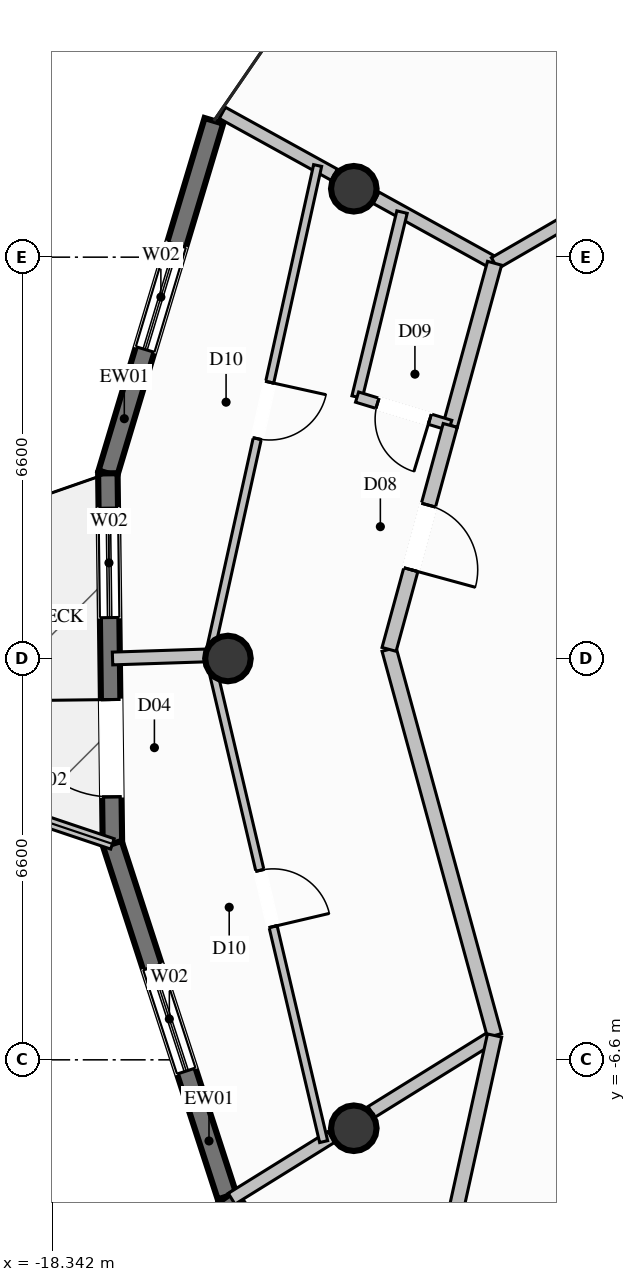
"""IFC4 building model, lengths in metres.
Left out: names, types, materials, properties, quantities, classifications, styles, units other than length and angle.
Written with IfcOpenShell. Run it as: python <this file> out.ifc"""

import sys

from ifc_helpers import new_model, si_unit, direction, frame, frame_2d, origin, origin_2d, place, context, subcontext, project, spatial, rectangle, circle, extrude, element, fill, save


model = new_model("IFC4")
c1 = context("Model", 3, precision=1e-05, world=origin(), true_north=direction((0.0, 1.0)))
c2 = subcontext(c1, "Body", "Model", "MODEL_VIEW")
j1 = project(units=[si_unit("LENGTHUNIT", "METRE"), si_unit("PLANEANGLEUNIT", "RADIAN")], contexts=[c1])
p1 = place(None, origin())
s1 = spatial("IfcSite", under=j1, at=p1, CompositionType="ELEMENT")
p2 = place(p1, origin())
s2 = spatial("IfcBuilding", under=s1, at=p2, CompositionType="ELEMENT")
p3 = place(p2, frame((0.0, 0.0, 250.6)))
s3 = spatial("IfcBuildingStorey", under=s2, at=p3, CompositionType="ELEMENT", Elevation=250.6)
for number, where, z_axis, x_axis in (
    (1, (-13.38, 7.725, 0.0), (0.0, 0.0, 1.0), (1.0, 0.0, 0.0)),
    (2, (-15.45, 0.0, 0.0), (0.0, 0.0, 1.0), (1.0, 0.0, 0.0)),
    (3, (-13.38, -7.725, 0.0), (0.0, 0.0, 1.0), (1.0, 0.0, 0.0)),
):
    element("IfcColumn", number, at=place(p3, frame(where, z_axis=z_axis, x_axis=x_axis)), inside=s3, PredefinedType="COLUMN", context=c2, shape_type="SweptSolid", body=[
        extrude(circle(Radius=0.375, at=origin_2d()), origin(), (0.0, 0.0, 1.0), 3.8),
    ])
p4 = place(p3, frame((-17.425, 3.045, 0.0), z_axis=(0.0, 0.0, 1.0), x_axis=(0.288106265848, 0.957598443806, 0.0)))
e4 = element("IfcWall", 4, at=p4, inside=s3, PredefinedType="SOLIDWALL", context=c2, shape_type="SweptSolid", body=[
    extrude(rectangle(XDim=6.054, YDim=0.32, at=frame_2d((3.027, 0.0))), origin(), (0.0, 0.0, 1.0), 3.57),
])
p5 = place(p4, frame((2.127, 0.0, 0.35)))
e5 = element("IfcOpeningElement", 5, at=p5, cuts=e4, PredefinedType="OPENING", context=c2, shape_type="SweptSolid", body=[
    extrude(rectangle(XDim=1.8, YDim=2.6, at=frame_2d((0.9, 1.3))), frame((0.0, 0.17, 0.0), z_axis=(0.0, -1.0, 0.0), x_axis=(1.0, 0.0, 0.0)), (0.0, 0.0, 1.0), 0.34),
])
p6 = place(p3, frame((-17.35, -3.049, 0.0), z_axis=(0.0, 0.0, 1.0), x_axis=(-0.012298256588, 0.999924373583, 0.0)))
e6 = element("IfcWall", 6, at=p6, inside=s3, PredefinedType="SOLIDWALL", context=c2, shape_type="SweptSolid", body=[
    extrude(rectangle(XDim=6.094, YDim=0.32, at=frame_2d((3.047, 0.0))), origin(), (0.0, 0.0, 1.0), 3.57),
])
p7 = place(p6, frame((3.722, 0.0, 0.35)))
e7 = element("IfcOpeningElement", 7, at=p7, cuts=e6, PredefinedType="OPENING", context=c2, shape_type="SweptSolid", body=[
    extrude(rectangle(XDim=1.8, YDim=2.6, at=frame_2d((0.9, 1.3))), frame((0.0, 0.17, 0.0), z_axis=(0.0, -1.0, 0.0), x_axis=(1.0, 0.0, 0.0)), (0.0, 0.0, 1.0), 0.34),
])
p8 = place(p6, frame((0.774, 0.0, 0.0)))
e8 = element("IfcOpeningElement", 8, at=p8, cuts=e6, PredefinedType="OPENING", context=c2, shape_type="SweptSolid", body=[
    extrude(rectangle(XDim=1.6, YDim=2.3, at=frame_2d((0.8, 1.15))), frame((0.0, 0.17, 0.0), z_axis=(0.0, -1.0, 0.0), x_axis=(1.0, 0.0, 0.0)), (0.0, 0.0, 1.0), 0.34),
])
p9 = place(p3, frame((-15.465, -8.846, 0.0), z_axis=(0.0, 0.0, 1.0), x_axis=(-0.309238214559, 0.950984609053, 0.0)))
e9 = element("IfcWall", 9, at=p9, inside=s3, PredefinedType="SOLIDWALL", context=c2, shape_type="SweptSolid", body=[
    extrude(rectangle(XDim=6.096, YDim=0.32, at=frame_2d((3.048, 0.0))), origin(), (0.0, 0.0, 1.0), 3.57),
])
p10 = place(p9, frame((2.168, 0.0, 0.35)))
e10 = element("IfcOpeningElement", 10, at=p10, cuts=e9, PredefinedType="OPENING", context=c2, shape_type="SweptSolid", body=[
    extrude(rectangle(XDim=1.8, YDim=2.6, at=frame_2d((0.9, 1.3))), frame((0.0, 0.17, 0.0), z_axis=(0.0, -1.0, 0.0), x_axis=(1.0, 0.0, 0.0)), (0.0, 0.0, 1.0), 0.34),
])
p11 = place(p3, frame((-11.953, -13.776, 0.0), z_axis=(0.0, 0.0, 1.0), x_axis=(-0.580234325627, 0.814449585526, 0.0)))
e11 = element("IfcWall", 11, at=p11, inside=s3, PredefinedType="SOLIDWALL", context=c2, shape_type="SweptSolid", body=[
    extrude(rectangle(XDim=6.053, YDim=0.32, at=frame_2d((3.026, 0.0))), origin(), (0.0, 0.0, 1.0), 3.57),
])
p12 = place(p11, frame((2.994, 0.0, 0.35)))
e12 = element("IfcOpeningElement", 12, at=p12, cuts=e11, PredefinedType="OPENING", context=c2, shape_type="SweptSolid", body=[
    extrude(rectangle(XDim=1.8, YDim=2.6, at=frame_2d((0.9, 1.3))), frame((0.0, 0.17, 0.0), z_axis=(0.0, -1.0, 0.0), x_axis=(1.0, 0.0, 0.0)), (0.0, 0.0, 1.0), 0.34),
])
p13 = place(p3, frame((-19.525, -2.318, 0.0), z_axis=(0.0, 0.0, 1.0), x_axis=(0.947892929032, -0.318589069322, 0.0)))
e13 = element("IfcWall", 13, at=p13, inside=s3, PredefinedType="PARAPET", context=c2, shape_type="SweptSolid", body=[
    extrude(rectangle(XDim=2.294, YDim=0.18, at=frame_2d((1.147, 0.0))), origin(), (0.0, 0.0, 1.0), 1.12),
])
p14 = place(p3, frame((-11.065, 6.5, 0.0), z_axis=(0.0, 0.0, 1.0), x_axis=(-0.875272070591, 0.483630853486, 0.0)))
e14 = element("IfcWall", 14, at=p14, inside=s3, PredefinedType="PARTITIONING", context=c2, shape_type="SweptSolid", body=[
    extrude(rectangle(XDim=2.227, YDim=0.21, at=frame_2d((1.113, 0.0))), origin(), (0.0, 0.0, 1.0), 3.086),
])
p15 = place(p3, frame((-13.701, 7.956, 0.0), z_axis=(0.0, 0.0, 1.0), x_axis=(-0.875359190626, 0.483473150637, 0.0)))
e15 = element("IfcWall", 15, at=p15, inside=s3, PredefinedType="PARTITIONING", context=c2, shape_type="SweptSolid", body=[
    extrude(rectangle(XDim=2.103, YDim=0.21, at=frame_2d((1.052, 0.0))), origin(), (0.0, 0.0, 1.0), 3.57),
])
p16 = place(p3, frame((-11.065, -6.2, 0.0), z_axis=(0.0, 0.0, 1.0), x_axis=(-0.84962275773, -0.527390907722, 0.0)))
e16 = element("IfcWall", 16, at=p16, inside=s3, PredefinedType="PARTITIONING", context=c2, shape_type="SweptSolid", body=[
    extrude(rectangle(XDim=2.384, YDim=0.21, at=frame_2d((1.192, 0.0))), origin(), (0.0, 0.0, 1.0), 3.086),
])
p17 = place(p3, frame((-13.749, -7.867, 0.0), z_axis=(0.0, 0.0, 1.0), x_axis=(-0.849593260604, -0.527438424403, 0.0)))
e17 = element("IfcWall", 17, at=p17, inside=s3, PredefinedType="PARTITIONING", context=c2, shape_type="SweptSolid", body=[
    extrude(rectangle(XDim=1.93, YDim=0.21, at=frame_2d((0.965, 0.0))), origin(), (0.0, 0.0, 1.0), 3.57),
])
p18 = place(p3, frame((-11.065, 6.5, 0.0), z_axis=(0.0, 0.0, 1.0), x_axis=(0.865506757898, 0.50089724698, 0.0)))
e18 = element("IfcWall", 18, at=p18, inside=s3, PredefinedType="PARTITIONING", context=c2, shape_type="SweptSolid", body=[
    extrude(rectangle(XDim=4.292, YDim=0.21, at=frame_2d((2.146, 0.0))), origin(), (0.0, 0.0, 1.0), 3.57),
])
p19 = place(p3, frame((-11.065, 6.5, 0.0), z_axis=(0.0, 0.0, 1.0), x_axis=(-0.263670269996, -0.964612869871, 0.0)))
e19 = element("IfcWall", 19, at=p19, inside=s3, PredefinedType="PARTITIONING", context=c2, shape_type="SweptSolid", body=[
    extrude(rectangle(XDim=2.765, YDim=0.24, at=frame_2d((1.382, 0.0))), origin(), (0.0, 0.0, 1.0), 3.57),
])
p20 = place(p3, frame((-12.587, 7.341, 0.0), z_axis=(0.0, 0.0, 1.0), x_axis=(-0.236070972306, -0.971735815968, 0.0)))
e20 = element("IfcWall", 20, at=p20, inside=s3, PredefinedType="PLUMBINGWALL", context=c2, shape_type="SweptSolid", body=[
    extrude(rectangle(XDim=3.13, YDim=0.175, at=frame_2d((1.565, 0.0))), origin(), (0.0, 0.0, 1.0), 3.57),
])
p21 = place(p3, frame((-11.794, 3.833, 0.0), z_axis=(0.0, 0.0, 1.0), x_axis=(-0.956707110137, 0.29105241008, 0.0)))
e21 = element("IfcWall", 21, at=p21, inside=s3, PredefinedType="PLUMBINGWALL", context=c2, shape_type="SweptSolid", body=[
    extrude(rectangle(XDim=1.601, YDim=0.175, at=frame_2d((0.801, 0.0))), origin(), (0.0, 0.0, 1.0), 3.57),
])
p22 = place(p21, frame((0.351, 0.0, 0.0)))
e22 = element("IfcOpeningElement", 22, at=p22, cuts=e21, PredefinedType="OPENING", context=c2, shape_type="SweptSolid", body=[
    extrude(rectangle(XDim=0.9, YDim=2.1, at=frame_2d((0.45, 1.05))), frame((0.0, 0.098, 0.0), z_axis=(0.0, -1.0, 0.0), x_axis=(1.0, 0.0, 0.0)), (0.0, 0.0, 1.0), 0.195),
])
p23 = place(p3, frame((-15.756, 0.052, 0.0), z_axis=(0.0, 0.0, 1.0), x_axis=(-0.999466804389, -0.032651292843, 0.0)))
e23 = element("IfcWall", 23, at=p23, inside=s3, PredefinedType="PARTITIONING", context=c2, shape_type="SweptSolid", body=[
    extrude(rectangle(XDim=1.593, YDim=0.21, at=frame_2d((0.796, 0.0))), origin(), (0.0, 0.0, 1.0), 3.57),
])
p24 = place(p3, frame((-12.8, 0.15, 0.0), z_axis=(0.0, 0.0, 1.0), x_axis=(0.263588113382, -0.964635323054, 0.0)))
e24 = element("IfcWall", 24, at=p24, inside=s3, PredefinedType="PARTITIONING", context=c2, shape_type="SweptSolid", body=[
    extrude(rectangle(XDim=6.583, YDim=0.24, at=frame_2d((3.292, 0.0))), origin(), (0.0, 0.0, 1.0), 3.57),
])
p25 = place(p3, frame((-11.794, 3.833, 0.0), z_axis=(0.0, 0.0, 1.0), x_axis=(-0.263512359615, -0.964656019693, 0.0)))
e25 = element("IfcWall", 25, at=p25, inside=s3, PredefinedType="PARTITIONING", context=c2, shape_type="SweptSolid", body=[
    extrude(rectangle(XDim=3.818, YDim=0.24, at=frame_2d((1.909, 0.0))), origin(), (0.0, 0.0, 1.0), 3.57),
])
p26 = place(p25, frame((1.359, 0.0, 0.0)))
e26 = element("IfcOpeningElement", 26, at=p26, cuts=e25, PredefinedType="OPENING", context=c2, shape_type="SweptSolid", body=[
    extrude(rectangle(XDim=1.1, YDim=2.3, at=frame_2d((0.55, 1.15))), frame((0.0, 0.13, 0.0), z_axis=(0.0, -1.0, 0.0), x_axis=(1.0, 0.0, 0.0)), (0.0, 0.0, 1.0), 0.26),
])
p27 = place(p3, frame((-13.975, 8.107, 0.0), z_axis=(0.0, 0.0, 1.0), x_axis=(-0.215893129174, -0.97641699943, 0.0)))
e27 = element("IfcWall", 27, at=p27, inside=s3, PredefinedType="PARTITIONING", context=c2, shape_type="SweptSolid", body=[
    extrude(rectangle(XDim=8.25, YDim=0.135, at=frame_2d((4.125, 0.0))), origin(), (0.0, 0.0, 1.0), 3.139),
])
p28 = place(p27, frame((3.65, 0.0, 0.0)))
e28 = element("IfcOpeningElement", 28, at=p28, cuts=e27, PredefinedType="OPENING", context=c2, shape_type="SweptSolid", body=[
    extrude(rectangle(XDim=0.95, YDim=2.1, at=frame_2d((0.475, 1.05))), frame((0.0, 0.078, 0.0), z_axis=(0.0, -1.0, 0.0), x_axis=(1.0, 0.0, 0.0)), (0.0, 0.0, 1.0), 0.155),
])
p29 = place(p3, frame((-15.756, 0.052, 0.0), z_axis=(0.0, 0.0, 1.0), x_axis=(0.228862090804, -0.973458855521, 0.0)))
e29 = element("IfcWall", 29, at=p29, inside=s3, PredefinedType="PARTITIONING", context=c2, shape_type="SweptSolid", body=[
    extrude(rectangle(XDim=8.215, YDim=0.135, at=frame_2d((4.107, 0.0))), origin(), (0.0, 0.0, 1.0), 3.139),
])
p30 = place(p29, frame((3.633, 0.0, 0.0)))
e30 = element("IfcOpeningElement", 30, at=p30, cuts=e29, PredefinedType="OPENING", context=c2, shape_type="SweptSolid", body=[
    extrude(rectangle(XDim=0.95, YDim=2.1, at=frame_2d((0.475, 1.05))), frame((0.0, 0.078, 0.0), z_axis=(0.0, -1.0, 0.0), x_axis=(1.0, 0.0, 0.0)), (0.0, 0.0, 1.0), 0.155),
])
p31 = place(p3, frame((-11.065, -6.2, 0.0), z_axis=(0.0, 0.0, 1.0), x_axis=(-0.215375028734, -0.976531411168, 0.0)))
e31 = element("IfcWall", 31, at=p31, inside=s3, PredefinedType="PARTITIONING", context=c2, shape_type="SweptSolid", body=[
    extrude(rectangle(XDim=5.735, YDim=0.24, at=frame_2d((2.867, 0.0))), origin(), (0.0, 0.0, 1.0), 3.57),
])
p32 = place(p5, origin())
e32 = element("IfcWindow", 32, at=p32, inside=s3, PartitioningType="SINGLE_PANEL", PredefinedType="WINDOW", context=c2, shape_type="SweptSolid", body=[
    extrude(rectangle(XDim=1.8, YDim=2.6, at=frame_2d((0.9, 1.3))), frame((0.0, 0.03, 0.0), z_axis=(0.0, -1.0, 0.0), x_axis=(1.0, 0.0, 0.0)), (0.0, 0.0, 1.0), 0.06),
])
fill(e5, e32)
p33 = place(p7, origin())
e33 = element("IfcWindow", 33, at=p33, inside=s3, PartitioningType="SINGLE_PANEL", PredefinedType="WINDOW", context=c2, shape_type="SweptSolid", body=[
    extrude(rectangle(XDim=1.8, YDim=2.6, at=frame_2d((0.9, 1.3))), frame((0.0, 0.03, 0.0), z_axis=(0.0, -1.0, 0.0), x_axis=(1.0, 0.0, 0.0)), (0.0, 0.0, 1.0), 0.06),
])
fill(e7, e33)
p34 = place(p8, origin())
e34 = element("IfcDoor", 34, at=p34, inside=s3, OperationType="SINGLE_SWING_RIGHT", PredefinedType="DOOR", context=c2, shape_type="SweptSolid", body=[
    extrude(rectangle(XDim=1.6, YDim=2.3, at=frame_2d((0.8, 1.15))), frame((0.0, 0.025, 0.0), z_axis=(0.0, -1.0, 0.0), x_axis=(1.0, 0.0, 0.0)), (0.0, 0.0, 1.0), 0.05),
])
fill(e8, e34)
p35 = place(p10, origin())
e35 = element("IfcWindow", 35, at=p35, inside=s3, PartitioningType="SINGLE_PANEL", PredefinedType="WINDOW", context=c2, shape_type="SweptSolid", body=[
    extrude(rectangle(XDim=1.8, YDim=2.6, at=frame_2d((0.9, 1.3))), frame((0.0, 0.03, 0.0), z_axis=(0.0, -1.0, 0.0), x_axis=(1.0, 0.0, 0.0)), (0.0, 0.0, 1.0), 0.06),
])
fill(e10, e35)
p36 = place(p22, origin())
e36 = element("IfcDoor", 36, at=p36, inside=s3, OperationType="SINGLE_SWING_LEFT", PredefinedType="DOOR", context=c2, shape_type="SweptSolid", body=[
    extrude(rectangle(XDim=0.9, YDim=2.1, at=frame_2d((0.45, 1.05))), frame((0.0, 0.025, 0.0), z_axis=(0.0, -1.0, 0.0), x_axis=(1.0, 0.0, 0.0)), (0.0, 0.0, 1.0), 0.05),
])
fill(e22, e36)
p37 = place(p26, origin())
e37 = element("IfcDoor", 37, at=p37, inside=s3, OperationType="SINGLE_SWING_RIGHT", PredefinedType="DOOR", context=c2, shape_type="SweptSolid", body=[
    extrude(rectangle(XDim=1.1, YDim=2.3, at=frame_2d((0.55, 1.15))), frame((0.0, 0.025, 0.0), z_axis=(0.0, -1.0, 0.0), x_axis=(1.0, 0.0, 0.0)), (0.0, 0.0, 1.0), 0.05),
])
fill(e26, e37)
p38 = place(p28, origin())
e38 = element("IfcDoor", 38, at=p38, inside=s3, OperationType="SINGLE_SWING_LEFT", PredefinedType="DOOR", context=c2, shape_type="SweptSolid", body=[
    extrude(rectangle(XDim=0.95, YDim=2.1, at=frame_2d((0.475, 1.05))), frame((0.0, 0.025, 0.0), z_axis=(0.0, -1.0, 0.0), x_axis=(1.0, 0.0, 0.0)), (0.0, 0.0, 1.0), 0.05),
])
fill(e28, e38)
p39 = place(p30, origin())
e39 = element("IfcDoor", 39, at=p39, inside=s3, OperationType="SINGLE_SWING_RIGHT", PredefinedType="DOOR", context=c2, shape_type="SweptSolid", body=[
    extrude(rectangle(XDim=0.95, YDim=2.1, at=frame_2d((0.475, 1.05))), frame((0.0, 0.025, 0.0), z_axis=(0.0, -1.0, 0.0), x_axis=(1.0, 0.0, 0.0)), (0.0, 0.0, 1.0), 0.05),
])
fill(e30, e39)
save(model, sys.argv[1])
